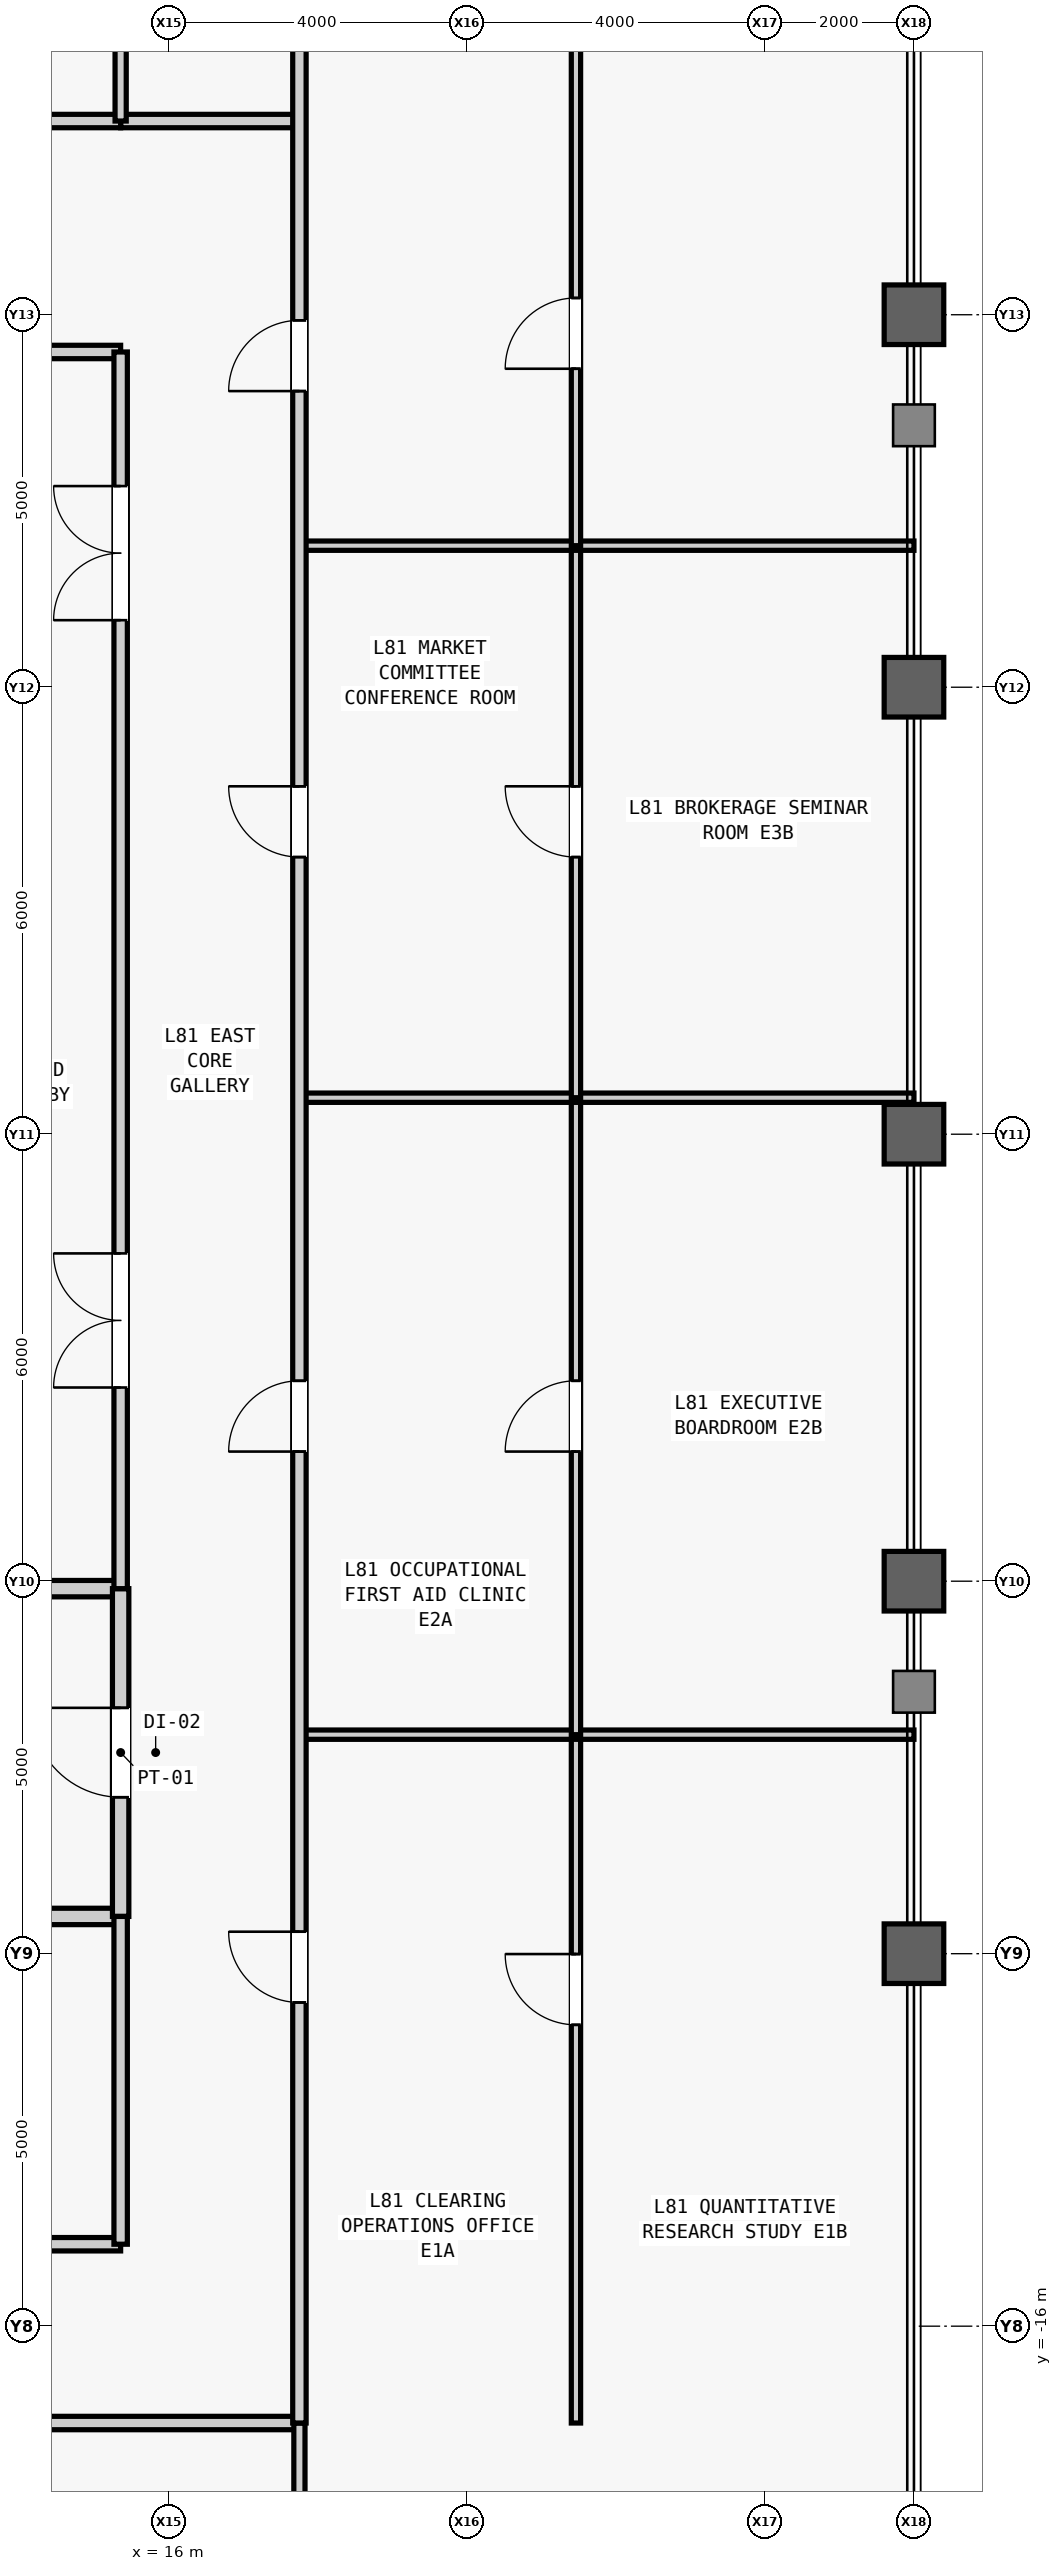
"""IFC4 building model, lengths in metres.
Left out: names, types, materials, properties, quantities, classifications, styles, units other than length and angle.
Written with IfcOpenShell. Run it as: python <this file> out.ifc"""

import sys

from ifc_helpers import new_model, si_unit, direction, frame, frame_2d, origin, origin_2d, place, context, subcontext, project, spatial, rectangle, hollow_rectangle, extrude, source, transform, mapped, element, fill, save


model = new_model("IFC4")
c1 = context("Model", 3, precision=1e-05, world=origin(), true_north=direction((0.0, 1.0)))
c2 = subcontext(c1, "Body", "Model", "MODEL_VIEW")
j1 = project(units=[si_unit("LENGTHUNIT", "METRE"), si_unit("PLANEANGLEUNIT", "RADIAN")], contexts=[c1])
p1 = place(None, origin())
s1 = spatial("IfcSite", under=j1, at=p1, CompositionType="ELEMENT")
p2 = place(p1, origin())
s2 = spatial("IfcBuilding", under=s1, at=p2, CompositionType="ELEMENT")
p3 = place(p2, frame((0.0, 0.0, 342.3)))
s3 = spatial("IfcBuildingStorey", under=s2, at=p3, CompositionType="ELEMENT", Elevation=342.3)
m1 = source(origin(), c2, "Body", "SweptSolid", [
    extrude(hollow_rectangle(XDim=0.8, YDim=0.8, WallThickness=0.045, at=origin_2d()), origin(), (0.0, 0.0, 1.0), 4.0),
])
for number, where, z_axis, x_axis in (
    (1, (26.0, -11.0, 0.0), (0.0, 0.0, 1.0), (1.0, 0.0, 0.0)),
    (2, (26.0, -6.0, 0.0), (0.0, 0.0, 1.0), (1.0, 0.0, 0.0)),
    (3, (26.0, 0.0, 0.0), (0.0, 0.0, 1.0), (1.0, 0.0, 0.0)),
    (4, (26.0, 6.0, 0.0), (0.0, 0.0, 1.0), (1.0, 0.0, 0.0)),
    (5, (26.0, 11.0, 0.0), (0.0, 0.0, 1.0), (1.0, 0.0, 0.0)),
):
    element("IfcColumn", number, at=place(p3, frame(where, z_axis=z_axis, x_axis=x_axis)), inside=s3, PredefinedType="COLUMN", context=c2, shape_type="MappedRepresentation", body=[
        mapped(m1, transform((0.0, 0.0, 0.0), scale=1.0)),
    ])
m2 = source(origin(), c2, "Body", "SweptSolid", [
    extrude(rectangle(XDim=4.05, YDim=0.22, at=frame_2d((2.025, 0.0))), origin(), (0.0, 0.0, 1.0), 3.7),
])
p4 = place(p3, frame((11.3, -10.5, 0.0), z_axis=(0.0, 0.0, 1.0), x_axis=(1.0, 0.0, 0.0)))
e6 = element("IfcWall", 6, at=p4, inside=s3, PredefinedType="PARTITIONING", context=c2, shape_type="MappedRepresentation", body=[
    mapped(m2, transform((0.0, 0.0, 0.0), scale=1.0)),
])
m3 = source(origin(), c2, "Body", "SweptSolid", [
    extrude(rectangle(XDim=4.05, YDim=0.22, at=frame_2d((2.025, 0.0))), origin(), (0.0, 0.0, 1.0), 3.084),
])
p5 = place(p3, frame((11.3, -6.1, 0.0), z_axis=(0.0, 0.0, 1.0), x_axis=(1.0, 0.0, 0.0)))
e7 = element("IfcWall", 7, at=p5, inside=s3, PredefinedType="PARTITIONING", context=c2, shape_type="MappedRepresentation", body=[
    mapped(m3, transform((0.0, 0.0, 0.0), scale=1.0)),
])
m4 = source(origin(), c2, "Body", "SweptSolid", [
    extrude(rectangle(XDim=4.4, YDim=0.22, at=frame_2d((2.2, 0.0))), origin(), (0.0, 0.0, 1.0), 3.7),
])
p6 = place(p3, frame((15.35, -10.5, 0.0), z_axis=(0.0, 0.0, 1.0), x_axis=(0.0, 1.0, 0.0)))
e8 = element("IfcWall", 8, at=p6, inside=s3, PredefinedType="PARTITIONING", context=c2, shape_type="MappedRepresentation", body=[
    mapped(m4, transform((0.0, 0.0, 0.0), scale=1.0)),
])
m5 = source(origin(), c2, "Body", "SweptSolid", [
    extrude(rectangle(XDim=1.2, YDim=2.2, at=frame_2d((0.6, 1.1))), frame((0.0, 0.12, 0.0), z_axis=(0.0, -1.0, 0.0), x_axis=(1.0, 0.0, 0.0)), (0.0, 0.0, 1.0), 0.24),
])
p7 = place(p6, frame((1.6, 0.0, 0.0)))
e9 = element("IfcOpeningElement", 9, at=p7, cuts=e8, PredefinedType="OPENING", context=c2, shape_type="MappedRepresentation", body=[
    mapped(m5, transform((0.0, 0.0, 0.0), scale=1.0)),
])
m6 = source(origin(), c2, "Body", "SweptSolid", [
    extrude(rectangle(XDim=4.05, YDim=0.18, at=frame_2d((2.025, 0.0))), origin(), (0.0, 0.0, 1.0), 3.7),
])
p8 = place(p3, frame((11.3, 10.5, 0.0), z_axis=(0.0, 0.0, 1.0), x_axis=(1.0, 0.0, 0.0)))
e10 = element("IfcWall", 10, at=p8, inside=s3, PredefinedType="PARTITIONING", context=c2, shape_type="MappedRepresentation", body=[
    mapped(m6, transform((0.0, 0.0, 0.0), scale=1.0)),
])
m7 = source(origin(), c2, "Body", "SweptSolid", [
    extrude(rectangle(XDim=16.6, YDim=0.18, at=frame_2d((8.3, 0.0))), origin(), (0.0, 0.0, 1.0), 3.7),
])
p9 = place(p3, frame((15.35, -6.1, 0.0), z_axis=(0.0, 0.0, 1.0), x_axis=(0.0, 1.0, 0.0)))
e11 = element("IfcWall", 11, at=p9, inside=s3, PredefinedType="PARTITIONING", context=c2, shape_type="MappedRepresentation", body=[
    mapped(m7, transform((0.0, 0.0, 0.0), scale=1.0)),
])
m8 = source(origin(), c2, "Body", "SweptSolid", [
    extrude(rectangle(XDim=1.8, YDim=2.25, at=frame_2d((0.9, 1.125))), frame((0.0, 0.1, 0.0), z_axis=(0.0, -1.0, 0.0), x_axis=(1.0, 0.0, 0.0)), (0.0, 0.0, 1.0), 0.2),
])
p10 = place(p9, frame((2.7, 0.0, 0.0)))
e12 = element("IfcOpeningElement", 12, at=p10, cuts=e11, PredefinedType="OPENING", context=c2, shape_type="MappedRepresentation", body=[
    mapped(m8, transform((0.0, 0.0, 0.0), scale=1.0)),
])
p11 = place(p9, frame((13.0, 0.0, 0.0)))
e13 = element("IfcOpeningElement", 13, at=p11, cuts=e11, PredefinedType="OPENING", context=c2, shape_type="MappedRepresentation", body=[
    mapped(m8, transform((0.0, 0.0, 0.0), scale=1.0)),
])
m9 = source(origin(), c2, "Body", "SweptSolid", [
    extrude(rectangle(XDim=14.05, YDim=0.18, at=frame_2d((7.025, 0.0))), origin(), (0.0, 0.0, 1.0), 3.7),
])
p12 = place(p3, frame((1.3, -14.9, 0.0), z_axis=(0.0, 0.0, 1.0), x_axis=(1.0, 0.0, 0.0)))
e14 = element("IfcWall", 14, at=p12, inside=s3, PredefinedType="PARTITIONING", context=c2, shape_type="MappedRepresentation", body=[
    mapped(m9, transform((0.0, 0.0, 0.0), scale=1.0)),
])
m10 = source(origin(), c2, "Body", "SweptSolid", [
    extrude(rectangle(XDim=0.9, YDim=2.15, at=frame_2d((0.45, 1.075))), frame((0.0, 0.1, 0.0), z_axis=(0.0, -1.0, 0.0), x_axis=(1.0, 0.0, 0.0)), (0.0, 0.0, 1.0), 0.2),
])
p13 = place(p12, frame((6.25, 0.0, 0.0)))
e15 = element("IfcOpeningElement", 15, at=p13, cuts=e14, PredefinedType="OPENING", context=c2, shape_type="MappedRepresentation", body=[
    mapped(m10, transform((0.0, 0.0, 0.0), scale=1.0)),
])
m11 = source(origin(), c2, "Body", "SweptSolid", [
    extrude(rectangle(XDim=4.4, YDim=0.18, at=frame_2d((2.2, 0.0))), origin(), (0.0, 0.0, 1.0), 3.7),
])
p14 = place(p3, frame((15.35, -14.9, 0.0), z_axis=(0.0, 0.0, 1.0), x_axis=(0.0, 1.0, 0.0)))
e16 = element("IfcWall", 16, at=p14, inside=s3, PredefinedType="PARTITIONING", context=c2, shape_type="MappedRepresentation", body=[
    mapped(m11, transform((0.0, 0.0, 0.0), scale=1.0)),
])
m12 = source(origin(), c2, "Body", "SweptSolid", [
    extrude(rectangle(XDim=2.4, YDim=0.18, at=frame_2d((1.2, 0.0))), origin(), (0.0, 0.0, 1.0), 3.7),
])
p15 = place(p3, frame((15.35, 13.6, 0.0), z_axis=(0.0, 0.0, 1.0), x_axis=(1.0, 0.0, 0.0)))
e17 = element("IfcWall", 17, at=p15, inside=s3, PredefinedType="PARTITIONING", context=c2, shape_type="MappedRepresentation", body=[
    mapped(m12, transform((0.0, 0.0, 0.0), scale=1.0)),
])
m13 = source(origin(), c2, "Body", "SweptSolid", [
    extrude(rectangle(XDim=36.3, YDim=0.18, at=frame_2d((18.15, 0.0))), origin(), (0.0, 0.0, 1.0), 3.7),
])
p16 = place(p3, frame((-18.55, -17.3, 0.0), z_axis=(0.0, 0.0, 1.0), x_axis=(1.0, 0.0, 0.0)))
e18 = element("IfcWall", 18, at=p16, inside=s3, PredefinedType="PARTITIONING", context=c2, shape_type="MappedRepresentation", body=[
    mapped(m13, transform((0.0, 0.0, 0.0), scale=1.0)),
])
m14 = source(origin(), c2, "Body", "SweptSolid", [
    extrude(rectangle(XDim=1.05, YDim=2.2, at=frame_2d((0.525, 1.1))), frame((0.0, 0.1, 0.0), z_axis=(0.0, -1.0, 0.0), x_axis=(1.0, 0.0, 0.0)), (0.0, 0.0, 1.0), 0.2),
])
p17 = place(p16, frame((9.05, 0.0, 0.0)))
e19 = element("IfcOpeningElement", 19, at=p17, cuts=e18, PredefinedType="OPENING", context=c2, shape_type="MappedRepresentation", body=[
    mapped(m14, transform((0.0, 0.0, 0.0), scale=1.0)),
])
p18 = place(p16, frame((26.175, 0.0, 0.0)))
e20 = element("IfcOpeningElement", 20, at=p18, cuts=e18, PredefinedType="OPENING", context=c2, shape_type="MappedRepresentation", body=[
    mapped(m14, transform((0.0, 0.0, 0.0), scale=1.0)),
])
m15 = source(origin(), c2, "Body", "SweptSolid", [
    extrude(rectangle(XDim=8.7, YDim=0.15, at=frame_2d((4.35, 0.0))), origin(), (0.0, 0.0, 1.0), 3.7),
])
p19 = place(p3, frame((17.75, -26.0, 0.0), z_axis=(0.0, 0.0, 1.0), x_axis=(0.0, 1.0, 0.0)))
e21 = element("IfcWall", 21, at=p19, inside=s3, PredefinedType="PARTITIONING", context=c2, shape_type="MappedRepresentation", body=[
    mapped(m15, transform((0.0, 0.0, 0.0), scale=1.0)),
])
m16 = source(origin(), c2, "Body", "SweptSolid", [
    extrude(rectangle(XDim=32.75, YDim=0.18, at=frame_2d((16.375, 0.0))), origin(), (0.0, 0.0, 1.0), 3.7),
])
p20 = place(p3, frame((-17.4, 13.6, 0.0), z_axis=(0.0, 0.0, 1.0), x_axis=(1.0, 0.0, 0.0)))
e22 = element("IfcWall", 22, at=p20, inside=s3, PredefinedType="PARTITIONING", context=c2, shape_type="MappedRepresentation", body=[
    mapped(m16, transform((0.0, 0.0, 0.0), scale=1.0)),
])
p21 = place(p20, frame((27.075, 0.0, 0.0)))
e23 = element("IfcOpeningElement", 23, at=p21, cuts=e22, PredefinedType="OPENING", context=c2, shape_type="MappedRepresentation", body=[
    mapped(m14, transform((0.0, 0.0, 0.0), scale=1.0)),
])
m17 = source(origin(), c2, "Body", "SweptSolid", [
    extrude(rectangle(XDim=12.4, YDim=0.15, at=frame_2d((6.2, 0.0))), origin(), (0.0, 0.0, 1.0), 3.7),
])
p22 = place(p3, frame((15.35, 13.6, 0.0), z_axis=(0.0, 0.0, 1.0), x_axis=(0.0, 1.0, 0.0)))
e24 = element("IfcWall", 24, at=p22, inside=s3, PredefinedType="PARTITIONING", context=c2, shape_type="MappedRepresentation", body=[
    mapped(m17, transform((0.0, 0.0, 0.0), scale=1.0)),
])
m18 = source(origin(), c2, "Body", "SweptSolid", [
    extrude(rectangle(XDim=9.24, YDim=0.125, at=frame_2d((4.62, 0.0))), origin(), (0.0, 0.0, 1.0), 3.7),
])
p23 = place(p3, frame((21.462, -17.3, 0.0), z_axis=(0.0, 0.0, 1.0), x_axis=(0.0, 1.0, 0.0)))
e25 = element("IfcWall", 25, at=p23, inside=s3, PredefinedType="PARTITIONING", context=c2, shape_type="MappedRepresentation", body=[
    mapped(m18, transform((0.0, 0.0, 0.0), scale=1.0)),
])
m19 = source(origin(), c2, "Body", "SweptSolid", [
    extrude(rectangle(XDim=0.95, YDim=2.15, at=frame_2d((0.475, 1.075))), frame((0.0, 0.073, 0.0), z_axis=(0.0, -1.0, 0.0), x_axis=(1.0, 0.0, 0.0)), (0.0, 0.0, 1.0), 0.145),
])
p24 = place(p23, frame((5.345, 0.0, 0.0)))
e26 = element("IfcOpeningElement", 26, at=p24, cuts=e25, PredefinedType="OPENING", context=c2, shape_type="MappedRepresentation", body=[
    mapped(m19, transform((0.0, 0.0, 0.0), scale=1.0)),
])
m20 = source(origin(), c2, "Body", "SweptSolid", [
    extrude(rectangle(XDim=8.25, YDim=0.125, at=frame_2d((4.125, 0.0))), origin(), (0.0, 0.0, 1.0), 3.7),
])
p25 = place(p3, frame((17.75, -8.06, 0.0), z_axis=(0.0, 0.0, 1.0), x_axis=(1.0, 0.0, 0.0)))
e27 = element("IfcWall", 27, at=p25, inside=s3, PredefinedType="PARTITIONING", context=c2, shape_type="MappedRepresentation", body=[
    mapped(m20, transform((0.0, 0.0, 0.0), scale=1.0)),
])
m21 = source(origin(), c2, "Body", "SweptSolid", [
    extrude(rectangle(XDim=8.55, YDim=0.125, at=frame_2d((4.275, 0.0))), origin(), (0.0, 0.0, 1.0), 3.7),
])
p26 = place(p3, frame((21.462, -8.06, 0.0), z_axis=(0.0, 0.0, 1.0), x_axis=(0.0, 1.0, 0.0)))
e28 = element("IfcWall", 28, at=p26, inside=s3, PredefinedType="PARTITIONING", context=c2, shape_type="MappedRepresentation", body=[
    mapped(m21, transform((0.0, 0.0, 0.0), scale=1.0)),
])
p27 = place(p26, frame((3.8, 0.0, 0.0)))
e29 = element("IfcOpeningElement", 29, at=p27, cuts=e28, PredefinedType="OPENING", context=c2, shape_type="MappedRepresentation", body=[
    mapped(m19, transform((0.0, 0.0, 0.0), scale=1.0)),
])
p28 = place(p3, frame((17.75, 0.49, 0.0), z_axis=(0.0, 0.0, 1.0), x_axis=(1.0, 0.0, 0.0)))
e30 = element("IfcWall", 30, at=p28, inside=s3, PredefinedType="PARTITIONING", context=c2, shape_type="MappedRepresentation", body=[
    mapped(m20, transform((0.0, 0.0, 0.0), scale=1.0)),
])
m22 = source(origin(), c2, "Body", "SweptSolid", [
    extrude(rectangle(XDim=7.41, YDim=0.125, at=frame_2d((3.705, 0.0))), origin(), (0.0, 0.0, 1.0), 3.7),
])
p29 = place(p3, frame((21.462, 0.49, 0.0), z_axis=(0.0, 0.0, 1.0), x_axis=(0.0, 1.0, 0.0)))
e31 = element("IfcWall", 31, at=p29, inside=s3, PredefinedType="PARTITIONING", context=c2, shape_type="MappedRepresentation", body=[
    mapped(m22, transform((0.0, 0.0, 0.0), scale=1.0)),
])
p30 = place(p29, frame((3.23, 0.0, 0.0)))
e32 = element("IfcOpeningElement", 32, at=p30, cuts=e31, PredefinedType="OPENING", context=c2, shape_type="MappedRepresentation", body=[
    mapped(m19, transform((0.0, 0.0, 0.0), scale=1.0)),
])
p31 = place(p3, frame((17.75, 7.9, 0.0), z_axis=(0.0, 0.0, 1.0), x_axis=(1.0, 0.0, 0.0)))
e33 = element("IfcWall", 33, at=p31, inside=s3, PredefinedType="PARTITIONING", context=c2, shape_type="MappedRepresentation", body=[
    mapped(m20, transform((0.0, 0.0, 0.0), scale=1.0)),
])
m23 = source(origin(), c2, "Body", "SweptSolid", [
    extrude(rectangle(XDim=11.8, YDim=0.125, at=frame_2d((5.9, 0.0))), origin(), (0.0, 0.0, 1.0), 3.7),
])
p32 = place(p3, frame((21.462, 7.9, 0.0), z_axis=(0.0, 0.0, 1.0), x_axis=(0.0, 1.0, 0.0)))
e34 = element("IfcWall", 34, at=p32, inside=s3, PredefinedType="PARTITIONING", context=c2, shape_type="MappedRepresentation", body=[
    mapped(m23, transform((0.0, 0.0, 0.0), scale=1.0)),
])
p33 = place(p32, frame((2.375, 0.0, 0.0)))
e35 = element("IfcOpeningElement", 35, at=p33, cuts=e34, PredefinedType="OPENING", context=c2, shape_type="MappedRepresentation", body=[
    mapped(m19, transform((0.0, 0.0, 0.0), scale=1.0)),
])
m24 = source(origin(), c2, "Body", "SweptSolid", [
    extrude(rectangle(XDim=37.3, YDim=0.18, at=frame_2d((18.65, 0.0))), origin(), (0.0, 0.0, 1.0), 3.7),
])
p34 = place(p3, frame((17.75, -17.3, 0.0), z_axis=(0.0, 0.0, 1.0), x_axis=(0.0, 1.0, 0.0)))
e36 = element("IfcWall", 36, at=p34, inside=s3, PredefinedType="PARTITIONING", context=c2, shape_type="MappedRepresentation", body=[
    mapped(m24, transform((0.0, 0.0, 0.0), scale=1.0)),
])
m25 = source(origin(), c2, "Body", "SweptSolid", [
    extrude(rectangle(XDim=0.95, YDim=2.15, at=frame_2d((0.475, 1.075))), frame((0.0, 0.1, 0.0), z_axis=(0.0, -1.0, 0.0), x_axis=(1.0, 0.0, 0.0)), (0.0, 0.0, 1.0), 0.2),
])
p35 = place(p34, frame((5.645, 0.0, 0.0)))
e37 = element("IfcOpeningElement", 37, at=p35, cuts=e36, PredefinedType="OPENING", context=c2, shape_type="MappedRepresentation", body=[
    mapped(m25, transform((0.0, 0.0, 0.0), scale=1.0)),
])
p36 = place(p34, frame((13.04, 0.0, 0.0)))
e38 = element("IfcOpeningElement", 38, at=p36, cuts=e36, PredefinedType="OPENING", context=c2, shape_type="MappedRepresentation", body=[
    mapped(m25, transform((0.0, 0.0, 0.0), scale=1.0)),
])
p37 = place(p34, frame((21.02, 0.0, 0.0)))
e39 = element("IfcOpeningElement", 39, at=p37, cuts=e36, PredefinedType="OPENING", context=c2, shape_type="MappedRepresentation", body=[
    mapped(m25, transform((0.0, 0.0, 0.0), scale=1.0)),
])
p38 = place(p34, frame((27.275, 0.0, 0.0)))
e40 = element("IfcOpeningElement", 40, at=p38, cuts=e36, PredefinedType="OPENING", context=c2, shape_type="MappedRepresentation", body=[
    mapped(m25, transform((0.0, 0.0, 0.0), scale=1.0)),
])
m26 = source(origin(), c2, "Body", "SweptSolid", [
    extrude(rectangle(XDim=1.2, YDim=2.2, at=frame_2d((0.6, 1.1))), frame((0.0, 0.025, 0.0), z_axis=(0.0, -1.0, 0.0), x_axis=(1.0, 0.0, 0.0)), (0.0, 0.0, 1.0), 0.05),
])
p39 = place(p7, origin())
e41 = element("IfcDoor", 41, at=p39, inside=s3, OperationType="SINGLE_SWING_RIGHT", PredefinedType="DOOR", context=c2, shape_type="MappedRepresentation", body=[
    mapped(m26, transform((0.0, 0.0, 0.0), scale=1.0)),
])
fill(e9, e41)
m27 = source(origin(), c2, "Body", "SweptSolid", [
    extrude(rectangle(XDim=1.8, YDim=2.25, at=frame_2d((0.9, 1.125))), frame((0.0, 0.025, 0.0), z_axis=(0.0, -1.0, 0.0), x_axis=(1.0, 0.0, 0.0)), (0.0, 0.0, 1.0), 0.05),
])
p40 = place(p10, origin())
e42 = element("IfcDoor", 42, at=p40, inside=s3, OperationType="SINGLE_SWING_RIGHT", PredefinedType="DOOR", context=c2, shape_type="MappedRepresentation", body=[
    mapped(m27, transform((0.0, 0.0, 0.0), scale=1.0)),
])
fill(e12, e42)
p41 = place(p11, origin())
e43 = element("IfcDoor", 43, at=p41, inside=s3, OperationType="SINGLE_SWING_LEFT", PredefinedType="DOOR", context=c2, shape_type="MappedRepresentation", body=[
    mapped(m27, transform((0.0, 0.0, 0.0), scale=1.0)),
])
fill(e13, e43)
m28 = source(origin(), c2, "Body", "SweptSolid", [
    extrude(rectangle(XDim=0.95, YDim=2.15, at=frame_2d((0.475, 1.075))), frame((0.0, 0.025, 0.0), z_axis=(0.0, -1.0, 0.0), x_axis=(1.0, 0.0, 0.0)), (0.0, 0.0, 1.0), 0.05),
])
p42 = place(p24, origin())
e44 = element("IfcDoor", 44, at=p42, inside=s3, OperationType="SINGLE_SWING_RIGHT", PredefinedType="DOOR", context=c2, shape_type="MappedRepresentation", body=[
    mapped(m28, transform((0.0, 0.0, 0.0), scale=1.0)),
])
fill(e26, e44)
p43 = place(p27, origin())
e45 = element("IfcDoor", 45, at=p43, inside=s3, OperationType="SINGLE_SWING_LEFT", PredefinedType="DOOR", context=c2, shape_type="MappedRepresentation", body=[
    mapped(m28, transform((0.0, 0.0, 0.0), scale=1.0)),
])
fill(e29, e45)
p44 = place(p30, origin())
e46 = element("IfcDoor", 46, at=p44, inside=s3, OperationType="SINGLE_SWING_RIGHT", PredefinedType="DOOR", context=c2, shape_type="MappedRepresentation", body=[
    mapped(m28, transform((0.0, 0.0, 0.0), scale=1.0)),
])
fill(e32, e46)
p45 = place(p33, origin())
e47 = element("IfcDoor", 47, at=p45, inside=s3, OperationType="SINGLE_SWING_LEFT", PredefinedType="DOOR", context=c2, shape_type="MappedRepresentation", body=[
    mapped(m28, transform((0.0, 0.0, 0.0), scale=1.0)),
])
fill(e35, e47)
p46 = place(p35, origin())
e48 = element("IfcDoor", 48, at=p46, inside=s3, OperationType="SINGLE_SWING_RIGHT", PredefinedType="DOOR", context=c2, shape_type="MappedRepresentation", body=[
    mapped(m28, transform((0.0, 0.0, 0.0), scale=1.0)),
])
fill(e37, e48)
p47 = place(p36, origin())
e49 = element("IfcDoor", 49, at=p47, inside=s3, OperationType="SINGLE_SWING_LEFT", PredefinedType="DOOR", context=c2, shape_type="MappedRepresentation", body=[
    mapped(m28, transform((0.0, 0.0, 0.0), scale=1.0)),
])
fill(e38, e49)
p48 = place(p37, origin())
e50 = element("IfcDoor", 50, at=p48, inside=s3, OperationType="SINGLE_SWING_RIGHT", PredefinedType="DOOR", context=c2, shape_type="MappedRepresentation", body=[
    mapped(m28, transform((0.0, 0.0, 0.0), scale=1.0)),
])
fill(e39, e50)
p49 = place(p38, origin())
e51 = element("IfcDoor", 51, at=p49, inside=s3, OperationType="SINGLE_SWING_LEFT", PredefinedType="DOOR", context=c2, shape_type="MappedRepresentation", body=[
    mapped(m28, transform((0.0, 0.0, 0.0), scale=1.0)),
])
fill(e40, e51)
save(model, sys.argv[1])
